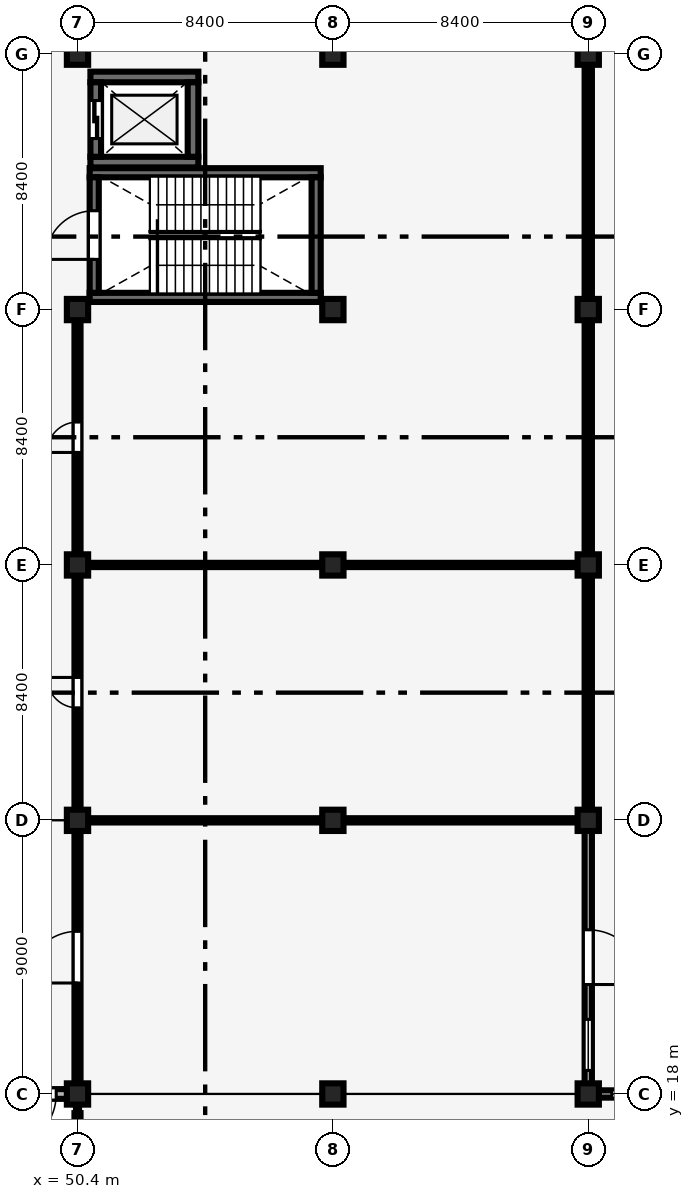
"""IFC4 building model, lengths in metres.
Left out: names, types, materials, properties, quantities, classifications, styles, units other than length and angle.
Written with IfcOpenShell. Run it as: python <this file> out.ifc"""

import sys

from ifc_helpers import new_model, si_unit, direction, frame, frame_2d, origin, origin_2d, place, context, subcontext, project, spatial, rectangle, extrude, element, fill, save


model = new_model("IFC4")
c1 = context("Model", 3, precision=1e-05, world=origin(), true_north=direction((0.0, 1.0)))
c2 = subcontext(c1, "Body", "Model", "MODEL_VIEW")
j1 = project(units=[si_unit("LENGTHUNIT", "METRE"), si_unit("PLANEANGLEUNIT", "RADIAN")], contexts=[c1])
p1 = place(None, origin())
s1 = spatial("IfcSite", under=j1, at=p1, CompositionType="ELEMENT")
p2 = place(p1, origin())
s2 = spatial("IfcBuilding", under=s1, at=p2, CompositionType="ELEMENT")
p3 = place(p2, origin())
s3 = spatial("IfcBuildingStorey", under=s2, at=p3, CompositionType="ELEMENT", Elevation=0.0)
for number, where, z_axis, x_axis in (
    (1, (50.4, 18.0, 0.0), (0.0, 0.0, 1.0), (1.0, 0.0, 0.0)),
    (2, (50.4, 27.0, 0.0), (0.0, 0.0, 1.0), (1.0, 0.0, 0.0)),
    (3, (50.4, 35.4, 0.0), (0.0, 0.0, 1.0), (1.0, 0.0, 0.0)),
    (4, (50.4, 43.8, 0.0), (0.0, 0.0, 1.0), (1.0, 0.0, 0.0)),
    (5, (50.4, 52.2, 0.0), (0.0, 0.0, 1.0), (1.0, 0.0, 0.0)),
    (6, (58.8, 18.0, 0.0), (0.0, 0.0, 1.0), (1.0, 0.0, 0.0)),
    (7, (58.8, 27.0, 0.0), (0.0, 0.0, 1.0), (1.0, 0.0, 0.0)),
    (8, (58.8, 35.4, 0.0), (0.0, 0.0, 1.0), (1.0, 0.0, 0.0)),
    (9, (58.8, 43.8, 0.0), (0.0, 0.0, 1.0), (1.0, 0.0, 0.0)),
    (10, (58.8, 52.2, 0.0), (0.0, 0.0, 1.0), (1.0, 0.0, 0.0)),
    (11, (67.2, 18.0, 0.0), (0.0, 0.0, 1.0), (1.0, 0.0, 0.0)),
    (12, (67.2, 27.0, 0.0), (0.0, 0.0, 1.0), (1.0, 0.0, 0.0)),
    (13, (67.2, 35.4, 0.0), (0.0, 0.0, 1.0), (1.0, 0.0, 0.0)),
    (14, (67.2, 43.8, 0.0), (0.0, 0.0, 1.0), (1.0, 0.0, 0.0)),
    (15, (67.2, 52.2, 0.0), (0.0, 0.0, 1.0), (1.0, 0.0, 0.0)),
):
    element("IfcColumn", number, at=place(p3, frame(where, z_axis=z_axis, x_axis=x_axis)), inside=s3, PredefinedType="COLUMN", context=c2, shape_type="SweptSolid", body=[
        extrude(rectangle(XDim=0.7, YDim=0.7, at=origin_2d()), origin(), (0.0, 0.0, 1.0), 4.8),
    ])
p4 = place(p3, frame((42.325, 18.0, 0.0), z_axis=(0.0, 0.0, 1.0), x_axis=(1.0, 0.0, 0.0)))
e16 = element("IfcWall", 16, at=p4, inside=s3, PredefinedType="SOLIDWALL", context=c2, shape_type="SweptSolid", body=[
    extrude(rectangle(XDim=7.75, YDim=0.32, at=frame_2d((3.875, 0.0))), origin(), (0.0, 0.0, 1.0), 3.73),
])
p5 = place(p4, frame((7.375, 0.0, 0.0), z_axis=(0.0, 0.0, 1.0), x_axis=(-1.0, 0.0, 0.0)))
e17 = element("IfcOpeningElement", 17, at=p5, cuts=e16, PredefinedType="OPENING", context=c2, shape_type="SweptSolid", body=[
    extrude(rectangle(XDim=1.8, YDim=2.35, at=frame_2d((0.9, 1.175))), frame((0.0, 0.17, 0.0), z_axis=(0.0, -1.0, 0.0), x_axis=(1.0, 0.0, 0.0)), (0.0, 0.0, 1.0), 0.34),
])
p6 = place(p4, frame((0.45, 0.0, 0.95)))
e18 = element("IfcOpeningElement", 18, at=p6, cuts=e16, PredefinedType="OPENING", context=c2, shape_type="SweptSolid", body=[
    extrude(rectangle(XDim=1.68, YDim=1.8, at=frame_2d((0.84, 0.9))), frame((0.0, 0.17, 0.0), z_axis=(0.0, -1.0, 0.0), x_axis=(1.0, 0.0, 0.0)), (0.0, 0.0, 1.0), 0.34),
])
for number, where, z_axis, x_axis in (
    (19, (67.2, 27.325, 0.0), (0.0, 0.0, 1.0), (0.0, 1.0, 0.0)),
    (20, (67.2, 35.725, 0.0), (0.0, 0.0, 1.0), (0.0, 1.0, 0.0)),
    (21, (67.2, 44.125, 0.0), (0.0, 0.0, 1.0), (0.0, 1.0, 0.0)),
):
    element("IfcWall", number, at=place(p3, frame(where, z_axis=z_axis, x_axis=x_axis)), inside=s3, PredefinedType="SOLIDWALL", context=c2, shape_type="SweptSolid", body=[
        extrude(rectangle(XDim=7.75, YDim=0.24, at=frame_2d((3.875, 0.0))), origin(), (0.0, 0.0, 1.0), 1.15),
    ])
p7 = place(p3, frame((67.525, 18.0, 0.0), z_axis=(0.0, 0.0, 1.0), x_axis=(1.0, 0.0, 0.0)))
e22 = element("IfcWall", 22, at=p7, inside=s3, PredefinedType="SOLIDWALL", context=c2, shape_type="SweptSolid", body=[
    extrude(rectangle(XDim=7.948, YDim=0.24, at=frame_2d((3.974, 0.0))), origin(), (0.0, 0.0, 1.0), 3.877),
])
p8 = place(p7, frame((3.074, 0.0, 0.0)))
e23 = element("IfcOpeningElement", 23, at=p8, cuts=e22, PredefinedType="OPENING", context=c2, shape_type="SweptSolid", body=[
    extrude(rectangle(XDim=1.8, YDim=2.35, at=frame_2d((0.9, 1.175))), frame((0.0, 0.13, 0.0), z_axis=(0.0, -1.0, 0.0), x_axis=(1.0, 0.0, 0.0)), (0.0, 0.0, 1.0), 0.26),
])
p9 = place(p7, frame((0.45, 0.0, 0.95)))
e24 = element("IfcOpeningElement", 24, at=p9, cuts=e22, PredefinedType="OPENING", context=c2, shape_type="SweptSolid", body=[
    extrude(rectangle(XDim=1.68, YDim=1.8, at=frame_2d((0.84, 0.9))), frame((0.0, 0.13, 0.0), z_axis=(0.0, -1.0, 0.0), x_axis=(1.0, 0.0, 0.0)), (0.0, 0.0, 1.0), 0.26),
])
p10 = place(p3, frame((67.2, 18.325, 0.0), z_axis=(0.0, 0.0, 1.0), x_axis=(0.0, 1.0, 0.0)))
e25 = element("IfcWall", 25, at=p10, inside=s3, PredefinedType="SOLIDWALL", context=c2, shape_type="SweptSolid", body=[
    extrude(rectangle(XDim=8.35, YDim=0.24, at=frame_2d((4.175, 0.0))), origin(), (0.0, 0.0, 1.0), 3.78),
])
p11 = place(p10, frame((5.075, 0.0, 0.0), z_axis=(0.0, 0.0, 1.0), x_axis=(-1.0, 0.0, 0.0)))
e26 = element("IfcOpeningElement", 26, at=p11, cuts=e25, PredefinedType="OPENING", context=c2, shape_type="SweptSolid", body=[
    extrude(rectangle(XDim=1.8, YDim=2.35, at=frame_2d((0.9, 1.175))), frame((0.0, 0.13, 0.0), z_axis=(0.0, -1.0, 0.0), x_axis=(1.0, 0.0, 0.0)), (0.0, 0.0, 1.0), 0.26),
])
p12 = place(p10, frame((0.45, 0.0, 0.95)))
e27 = element("IfcOpeningElement", 27, at=p12, cuts=e25, PredefinedType="OPENING", context=c2, shape_type="SweptSolid", body=[
    extrude(rectangle(XDim=1.68, YDim=2.1, at=frame_2d((0.84, 1.05))), frame((0.0, 0.13, 0.0), z_axis=(0.0, -1.0, 0.0), x_axis=(1.0, 0.0, 0.0)), (0.0, 0.0, 1.0), 0.26),
])
for number, where, z_axis, x_axis in (
    (28, (50.8, 44.2, 0.0), (0.0, 0.0, 1.0), (1.0, 0.0, 0.0)),
    (29, (50.8, 48.3, 0.0), (0.0, 0.0, 1.0), (1.0, 0.0, 0.0)),
):
    element("IfcWall", number, at=place(p3, frame(where, z_axis=z_axis, x_axis=x_axis)), inside=s3, PredefinedType="SHEAR", context=c2, shape_type="SweptSolid", body=[
        extrude(rectangle(XDim=7.6, YDim=0.3, at=frame_2d((3.8, 0.0))), origin(), (0.0, 0.0, 1.0), 4.625),
    ])
p13 = place(p3, frame((50.95, 44.35, 0.0), z_axis=(0.0, 0.0, 1.0), x_axis=(0.0, 1.0, 0.0)))
e30 = element("IfcWall", 30, at=p13, inside=s3, PredefinedType="SHEAR", context=c2, shape_type="SweptSolid", body=[
    extrude(rectangle(XDim=3.8, YDim=0.3, at=frame_2d((1.9, 0.0))), origin(), (0.0, 0.0, 1.0), 4.625),
])
p14 = place(p13, frame((1.1, 0.0, 0.0)))
e31 = element("IfcOpeningElement", 31, at=p14, cuts=e30, PredefinedType="OPENING", context=c2, shape_type="SweptSolid", body=[
    extrude(rectangle(XDim=1.6, YDim=2.2, at=frame_2d((0.8, 1.1))), frame((0.0, 0.16, 0.0), z_axis=(0.0, -1.0, 0.0), x_axis=(1.0, 0.0, 0.0)), (0.0, 0.0, 1.0), 0.32),
])
p15 = place(p3, frame((58.25, 44.35, 0.0), z_axis=(0.0, 0.0, 1.0), x_axis=(0.0, 1.0, 0.0)))
e32 = element("IfcWall", 32, at=p15, inside=s3, PredefinedType="SHEAR", context=c2, shape_type="SweptSolid", body=[
    extrude(rectangle(XDim=3.8, YDim=0.3, at=frame_2d((1.9, 0.0))), origin(), (0.0, 0.0, 1.0), 4.625),
])
for number, where, z_axis, x_axis in (
    (33, (50.825, 48.65, 0.0), (0.0, 0.0, 1.0), (1.0, 0.0, 0.0)),
    (34, (50.825, 51.45, 0.0), (0.0, 0.0, 1.0), (1.0, 0.0, 0.0)),
):
    element("IfcWall", number, at=place(p3, frame(where, z_axis=z_axis, x_axis=x_axis)), inside=s3, PredefinedType="SHEAR", context=c2, shape_type="SweptSolid", body=[
        extrude(rectangle(XDim=3.55, YDim=0.35, at=frame_2d((1.775, 0.0))), origin(), (0.0, 0.0, 1.0), 4.52),
    ])
p16 = place(p3, frame((51.0, 48.825, 0.0), z_axis=(0.0, 0.0, 1.0), x_axis=(0.0, 1.0, 0.0)))
e35 = element("IfcWall", 35, at=p16, inside=s3, PredefinedType="SHEAR", context=c2, shape_type="SweptSolid", body=[
    extrude(rectangle(XDim=2.45, YDim=0.35, at=frame_2d((1.225, 0.0))), origin(), (0.0, 0.0, 1.0), 4.52),
])
p17 = place(p16, frame((0.6, 0.0, 0.0)))
e36 = element("IfcOpeningElement", 36, at=p17, cuts=e35, PredefinedType="OPENING", context=c2, shape_type="SweptSolid", body=[
    extrude(rectangle(XDim=1.25, YDim=2.25, at=frame_2d((0.625, 1.125))), frame((0.0, 0.185, 0.0), z_axis=(0.0, -1.0, 0.0), x_axis=(1.0, 0.0, 0.0)), (0.0, 0.0, 1.0), 0.37),
])
p18 = place(p3, frame((54.2, 48.825, 0.0), z_axis=(0.0, 0.0, 1.0), x_axis=(0.0, 1.0, 0.0)))
e37 = element("IfcWall", 37, at=p18, inside=s3, PredefinedType="SHEAR", context=c2, shape_type="SweptSolid", body=[
    extrude(rectangle(XDim=2.45, YDim=0.35, at=frame_2d((1.225, 0.0))), origin(), (0.0, 0.0, 1.0), 4.52),
])
p19 = place(p3, frame((50.505, 27.0, 0.0), z_axis=(0.0, 0.0, 1.0), x_axis=(1.0, 0.0, 0.0)))
e38 = element("IfcWall", 38, at=p19, inside=s3, PredefinedType="PARTITIONING", context=c2, shape_type="SweptSolid", body=[
    extrude(rectangle(XDim=7.935, YDim=0.14, at=frame_2d((3.968, 0.0))), origin(), (0.0, 0.0, 1.0), 3.78),
])
p20 = place(p3, frame((59.16, 27.0, 0.0), z_axis=(0.0, 0.0, 1.0), x_axis=(1.0, 0.0, 0.0)))
e39 = element("IfcWall", 39, at=p20, inside=s3, PredefinedType="PARTITIONING", context=c2, shape_type="SweptSolid", body=[
    extrude(rectangle(XDim=7.915, YDim=0.14, at=frame_2d((3.958, 0.0))), origin(), (0.0, 0.0, 1.0), 3.73),
])
p21 = place(p3, frame((50.505, 35.4, 0.0), z_axis=(0.0, 0.0, 1.0), x_axis=(1.0, 0.0, 0.0)))
e40 = element("IfcWall", 40, at=p21, inside=s3, PredefinedType="PARTITIONING", context=c2, shape_type="SweptSolid", body=[
    extrude(rectangle(XDim=7.935, YDim=0.14, at=frame_2d((3.968, 0.0))), origin(), (0.0, 0.0, 1.0), 3.96),
])
p22 = place(p3, frame((59.16, 35.4, 0.0), z_axis=(0.0, 0.0, 1.0), x_axis=(1.0, 0.0, 0.0)))
e41 = element("IfcWall", 41, at=p22, inside=s3, PredefinedType="PARTITIONING", context=c2, shape_type="SweptSolid", body=[
    extrude(rectangle(XDim=7.915, YDim=0.14, at=frame_2d((3.958, 0.0))), origin(), (0.0, 0.0, 1.0), 3.91),
])
p23 = place(p3, frame((50.4, 18.165, 0.0), z_axis=(0.0, 0.0, 1.0), x_axis=(0.0, 1.0, 0.0)))
e42 = element("IfcWall", 42, at=p23, inside=s3, PredefinedType="PARTITIONING", context=c2, shape_type="SweptSolid", body=[
    extrude(rectangle(XDim=8.475, YDim=0.2, at=frame_2d((4.237, 0.0))), origin(), (0.0, 0.0, 1.0), 3.88),
])
p24 = place(p23, frame((3.485, 0.0, 0.0)))
e43 = element("IfcOpeningElement", 43, at=p24, cuts=e42, PredefinedType="OPENING", context=c2, shape_type="SweptSolid", body=[
    extrude(rectangle(XDim=1.7, YDim=2.25, at=frame_2d((0.85, 1.125))), frame((0.0, 0.11, 0.0), z_axis=(0.0, -1.0, 0.0), x_axis=(1.0, 0.0, 0.0)), (0.0, 0.0, 1.0), 0.22),
])
p25 = place(p3, frame((50.4, 27.36, 0.0), z_axis=(0.0, 0.0, 1.0), x_axis=(0.0, 1.0, 0.0)))
e44 = element("IfcWall", 44, at=p25, inside=s3, PredefinedType="PARTITIONING", context=c2, shape_type="SweptSolid", body=[
    extrude(rectangle(XDim=7.68, YDim=0.2, at=frame_2d((3.84, 0.0))), origin(), (0.0, 0.0, 1.0), 3.96),
])
p26 = place(p25, frame((3.34, 0.0, 0.0)))
e45 = element("IfcOpeningElement", 45, at=p26, cuts=e44, PredefinedType="OPENING", context=c2, shape_type="SweptSolid", body=[
    extrude(rectangle(XDim=1.0, YDim=2.15, at=frame_2d((0.5, 1.075))), frame((0.0, 0.11, 0.0), z_axis=(0.0, -1.0, 0.0), x_axis=(1.0, 0.0, 0.0)), (0.0, 0.0, 1.0), 0.22),
])
p27 = place(p3, frame((50.4, 35.76, 0.0), z_axis=(0.0, 0.0, 1.0), x_axis=(0.0, 1.0, 0.0)))
e46 = element("IfcWall", 46, at=p27, inside=s3, PredefinedType="PARTITIONING", context=c2, shape_type="SweptSolid", body=[
    extrude(rectangle(XDim=7.68, YDim=0.2, at=frame_2d((3.84, 0.0))), origin(), (0.0, 0.0, 1.0), 3.91),
])
p28 = place(p27, frame((3.34, 0.0, 0.0)))
e47 = element("IfcOpeningElement", 47, at=p28, cuts=e46, PredefinedType="OPENING", context=c2, shape_type="SweptSolid", body=[
    extrude(rectangle(XDim=1.0, YDim=2.15, at=frame_2d((0.5, 1.075))), frame((0.0, 0.11, 0.0), z_axis=(0.0, -1.0, 0.0), x_axis=(1.0, 0.0, 0.0)), (0.0, 0.0, 1.0), 0.22),
])
p29 = place(p5, origin())
e48 = element("IfcDoor", 48, at=p29, inside=s3, OperationType="DOUBLE_DOOR_SINGLE_SWING", PredefinedType="DOOR", context=c2, shape_type="SweptSolid", body=[
    extrude(rectangle(XDim=1.8, YDim=2.35, at=frame_2d((0.9, 1.175))), frame((0.0, 0.025, 0.0), z_axis=(0.0, -1.0, 0.0), x_axis=(1.0, 0.0, 0.0)), (0.0, 0.0, 1.0), 0.05),
])
fill(e17, e48)
p30 = place(p9, origin())
e49 = element("IfcWindow", 49, at=p30, inside=s3, PartitioningType="SINGLE_PANEL", PredefinedType="WINDOW", context=c2, shape_type="SweptSolid", body=[
    extrude(rectangle(XDim=1.68, YDim=1.8, at=frame_2d((0.84, 0.9))), frame((0.0, 0.03, 0.0), z_axis=(0.0, -1.0, 0.0), x_axis=(1.0, 0.0, 0.0)), (0.0, 0.0, 1.0), 0.06),
])
fill(e24, e49)
p31 = place(p11, origin())
e50 = element("IfcDoor", 50, at=p31, inside=s3, OperationType="DOUBLE_DOOR_SINGLE_SWING", PredefinedType="DOOR", context=c2, shape_type="SweptSolid", body=[
    extrude(rectangle(XDim=1.8, YDim=2.35, at=frame_2d((0.9, 1.175))), frame((0.0, 0.025, 0.0), z_axis=(0.0, -1.0, 0.0), x_axis=(1.0, 0.0, 0.0)), (0.0, 0.0, 1.0), 0.05),
])
fill(e26, e50)
p32 = place(p12, origin())
e51 = element("IfcWindow", 51, at=p32, inside=s3, PartitioningType="SINGLE_PANEL", PredefinedType="WINDOW", context=c2, shape_type="SweptSolid", body=[
    extrude(rectangle(XDim=1.68, YDim=2.1, at=frame_2d((0.84, 1.05))), frame((0.0, 0.03, 0.0), z_axis=(0.0, -1.0, 0.0), x_axis=(1.0, 0.0, 0.0)), (0.0, 0.0, 1.0), 0.06),
])
fill(e27, e51)
p33 = place(p14, origin())
e52 = element("IfcDoor", 52, at=p33, inside=s3, OperationType="DOUBLE_DOOR_SINGLE_SWING", PredefinedType="DOOR", context=c2, shape_type="SweptSolid", body=[
    extrude(rectangle(XDim=1.6, YDim=2.2, at=frame_2d((0.8, 1.1))), frame((0.0, 0.025, 0.0), z_axis=(0.0, -1.0, 0.0), x_axis=(1.0, 0.0, 0.0)), (0.0, 0.0, 1.0), 0.05),
])
fill(e31, e52)
p34 = place(p17, origin())
e53 = element("IfcDoor", 53, at=p34, inside=s3, OperationType="DOUBLE_DOOR_SLIDING", PredefinedType="DOOR", context=c2, shape_type="SweptSolid", body=[
    extrude(rectangle(XDim=1.25, YDim=2.25, at=frame_2d((0.625, 1.125))), frame((0.0, 0.025, 0.0), z_axis=(0.0, -1.0, 0.0), x_axis=(1.0, 0.0, 0.0)), (0.0, 0.0, 1.0), 0.05),
])
fill(e36, e53)
p35 = place(p24, origin())
e54 = element("IfcDoor", 54, at=p35, inside=s3, OperationType="DOUBLE_DOOR_SINGLE_SWING", PredefinedType="DOOR", context=c2, shape_type="SweptSolid", body=[
    extrude(rectangle(XDim=1.7, YDim=2.25, at=frame_2d((0.85, 1.125))), frame((0.0, 0.025, 0.0), z_axis=(0.0, -1.0, 0.0), x_axis=(1.0, 0.0, 0.0)), (0.0, 0.0, 1.0), 0.05),
])
fill(e43, e54)
p36 = place(p26, origin())
e55 = element("IfcDoor", 55, at=p36, inside=s3, OperationType="SINGLE_SWING_RIGHT", PredefinedType="DOOR", context=c2, shape_type="SweptSolid", body=[
    extrude(rectangle(XDim=1.0, YDim=2.15, at=frame_2d((0.5, 1.075))), frame((0.0, 0.025, 0.0), z_axis=(0.0, -1.0, 0.0), x_axis=(1.0, 0.0, 0.0)), (0.0, 0.0, 1.0), 0.05),
])
fill(e45, e55)
p37 = place(p28, origin())
e56 = element("IfcDoor", 56, at=p37, inside=s3, OperationType="SINGLE_SWING_LEFT", PredefinedType="DOOR", context=c2, shape_type="SweptSolid", body=[
    extrude(rectangle(XDim=1.0, YDim=2.15, at=frame_2d((0.5, 1.075))), frame((0.0, 0.025, 0.0), z_axis=(0.0, -1.0, 0.0), x_axis=(1.0, 0.0, 0.0)), (0.0, 0.0, 1.0), 0.05),
])
fill(e47, e56)
save(model, sys.argv[1])
